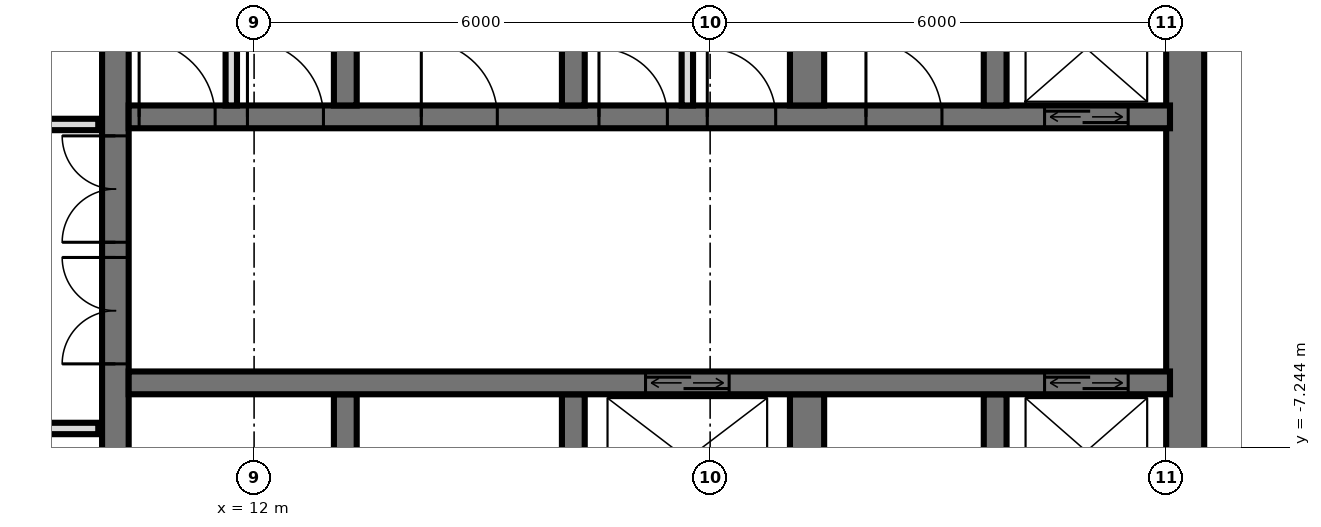
"""IFC4 building model, lengths in metres.
Left out: names, types, materials, properties, quantities, classifications, styles, units other than length and angle.
Written with IfcOpenShell. Run it as: python <this file> out.ifc"""

import sys

from ifc_helpers import new_model, si_unit, direction, frame, frame_2d, origin, place, context, subcontext, project, spatial, rectangle, extrude, element, fill, save


model = new_model("IFC4")
c1 = context("Model", 3, precision=1e-05, world=origin(), true_north=direction((0.0, 1.0)))
c2 = subcontext(c1, "Body", "Model", "MODEL_VIEW")
j1 = project(units=[si_unit("LENGTHUNIT", "METRE"), si_unit("PLANEANGLEUNIT", "RADIAN")], contexts=[c1])
p1 = place(None, origin())
s1 = spatial("IfcSite", under=j1, at=p1, CompositionType="ELEMENT")
p2 = place(p1, origin())
s2 = spatial("IfcBuilding", under=s1, at=p2, CompositionType="ELEMENT")
p3 = place(p2, frame((0.0, 0.0, 239.6)))
s3 = spatial("IfcBuildingStorey", under=s2, at=p3, CompositionType="ELEMENT", Elevation=239.6)
p4 = place(p3, frame((10.175, -14.55, 0.0), z_axis=(0.0, 0.0, 1.0), x_axis=(0.0, 1.0, 0.0)))
e1 = element("IfcWall", 1, at=p4, inside=s3, PredefinedType="SHEAR", context=c2, shape_type="SweptSolid", body=[
    extrude(rectangle(XDim=14.1, YDim=0.35, at=frame_2d((7.05, 0.0))), origin(), (0.0, 0.0, 1.0), 3.5),
])
p5 = place(p4, frame((8.4, 0.0, 0.0)))
e2 = element("IfcOpeningElement", 2, at=p5, cuts=e1, PredefinedType="OPENING", context=c2, shape_type="SweptSolid", body=[
    extrude(rectangle(XDim=1.4, YDim=2.4, at=frame_2d((0.7, 1.2))), frame((0.0, 0.185, 0.0), z_axis=(0.0, -1.0, 0.0), x_axis=(1.0, 0.0, 0.0)), (0.0, 0.0, 1.0), 0.37),
])
p6 = place(p4, frame((10.0, 0.0, 0.0)))
e3 = element("IfcOpeningElement", 3, at=p6, cuts=e1, PredefinedType="OPENING", context=c2, shape_type="SweptSolid", body=[
    extrude(rectangle(XDim=1.4, YDim=2.4, at=frame_2d((0.7, 1.2))), frame((0.0, 0.185, 0.0), z_axis=(0.0, -1.0, 0.0), x_axis=(1.0, 0.0, 0.0)), (0.0, 0.0, 1.0), 0.37),
])
p7 = place(p4, frame((4.0, 0.0, 0.0)))
e4 = element("IfcOpeningElement", 4, at=p7, cuts=e1, PredefinedType="OPENING", context=c2, shape_type="SweptSolid", body=[
    extrude(rectangle(XDim=1.2, YDim=2.1, at=frame_2d((0.6, 1.05))), frame((0.0, 0.185, 0.0), z_axis=(0.0, -1.0, 0.0), x_axis=(1.0, 0.0, 0.0)), (0.0, 0.0, 1.0), 0.37),
])
p8 = place(p3, frame((24.25, -14.55, 0.0), z_axis=(0.0, 0.0, 1.0), x_axis=(0.0, 1.0, 0.0)))
e5 = element("IfcWall", 5, at=p8, inside=s3, PredefinedType="SHEAR", context=c2, shape_type="SweptSolid", body=[
    extrude(rectangle(XDim=14.1, YDim=0.5, at=frame_2d((7.05, 0.0))), origin(), (0.0, 0.0, 1.0), 3.5),
])
p9 = place(p3, frame((10.35, -2.9, 0.0), z_axis=(0.0, 0.0, 1.0), x_axis=(1.0, 0.0, 0.0)))
e6 = element("IfcWall", 6, at=p9, inside=s3, PredefinedType="SHEAR", context=c2, shape_type="SweptSolid", body=[
    extrude(rectangle(XDim=13.7, YDim=0.3, at=frame_2d((6.85, 0.0))), origin(), (0.0, 0.0, 1.0), 3.5),
])
p10 = place(p9, frame((12.05, 0.0, 0.0)))
e7 = element("IfcOpeningElement", 7, at=p10, cuts=e6, PredefinedType="OPENING", context=c2, shape_type="SweptSolid", body=[
    extrude(rectangle(XDim=1.1, YDim=2.1, at=frame_2d((0.55, 1.05))), frame((0.0, 0.16, 0.0), z_axis=(0.0, -1.0, 0.0), x_axis=(1.0, 0.0, 0.0)), (0.0, 0.0, 1.0), 0.32),
])
p11 = place(p9, frame((6.188, 0.0, 0.0)))
e8 = element("IfcOpeningElement", 8, at=p11, cuts=e6, PredefinedType="OPENING", context=c2, shape_type="SweptSolid", body=[
    extrude(rectangle(XDim=0.9, YDim=2.1, at=frame_2d((0.45, 1.05))), frame((0.0, 0.16, 0.0), z_axis=(0.0, -1.0, 0.0), x_axis=(1.0, 0.0, 0.0)), (0.0, 0.0, 1.0), 0.32),
])
p12 = place(p9, frame((7.613, 0.0, 0.0)))
e9 = element("IfcOpeningElement", 9, at=p12, cuts=e6, PredefinedType="OPENING", context=c2, shape_type="SweptSolid", body=[
    extrude(rectangle(XDim=0.9, YDim=2.1, at=frame_2d((0.45, 1.05))), frame((0.0, 0.16, 0.0), z_axis=(0.0, -1.0, 0.0), x_axis=(1.0, 0.0, 0.0)), (0.0, 0.0, 1.0), 0.32),
])
p13 = place(p9, frame((0.137, 0.0, 0.0)))
e10 = element("IfcOpeningElement", 10, at=p13, cuts=e6, PredefinedType="OPENING", context=c2, shape_type="SweptSolid", body=[
    extrude(rectangle(XDim=1.0, YDim=2.1, at=frame_2d((0.5, 1.05))), frame((0.0, 0.16, 0.0), z_axis=(0.0, -1.0, 0.0), x_axis=(1.0, 0.0, 0.0)), (0.0, 0.0, 1.0), 0.32),
])
p14 = place(p9, frame((1.562, 0.0, 0.0)))
e11 = element("IfcOpeningElement", 11, at=p14, cuts=e6, PredefinedType="OPENING", context=c2, shape_type="SweptSolid", body=[
    extrude(rectangle(XDim=1.0, YDim=2.1, at=frame_2d((0.5, 1.05))), frame((0.0, 0.16, 0.0), z_axis=(0.0, -1.0, 0.0), x_axis=(1.0, 0.0, 0.0)), (0.0, 0.0, 1.0), 0.32),
])
p15 = place(p9, frame((3.85, 0.0, 0.0)))
e12 = element("IfcOpeningElement", 12, at=p15, cuts=e6, PredefinedType="OPENING", context=c2, shape_type="SweptSolid", body=[
    extrude(rectangle(XDim=1.0, YDim=2.1, at=frame_2d((0.5, 1.05))), frame((0.0, 0.16, 0.0), z_axis=(0.0, -1.0, 0.0), x_axis=(1.0, 0.0, 0.0)), (0.0, 0.0, 1.0), 0.32),
])
p16 = place(p9, frame((9.7, 0.0, 0.0)))
e13 = element("IfcOpeningElement", 13, at=p16, cuts=e6, PredefinedType="OPENING", context=c2, shape_type="SweptSolid", body=[
    extrude(rectangle(XDim=1.0, YDim=2.1, at=frame_2d((0.5, 1.05))), frame((0.0, 0.16, 0.0), z_axis=(0.0, -1.0, 0.0), x_axis=(1.0, 0.0, 0.0)), (0.0, 0.0, 1.0), 0.32),
])
p17 = place(p3, frame((10.35, -6.4, 0.0), z_axis=(0.0, 0.0, 1.0), x_axis=(1.0, 0.0, 0.0)))
e14 = element("IfcWall", 14, at=p17, inside=s3, PredefinedType="SHEAR", context=c2, shape_type="SweptSolid", body=[
    extrude(rectangle(XDim=13.7, YDim=0.3, at=frame_2d((6.85, 0.0))), origin(), (0.0, 0.0, 1.0), 3.5),
])
p18 = place(p17, frame((12.05, 0.0, 0.0)))
e15 = element("IfcOpeningElement", 15, at=p18, cuts=e14, PredefinedType="OPENING", context=c2, shape_type="SweptSolid", body=[
    extrude(rectangle(XDim=1.1, YDim=2.1, at=frame_2d((0.55, 1.05))), frame((0.0, 0.16, 0.0), z_axis=(0.0, -1.0, 0.0), x_axis=(1.0, 0.0, 0.0)), (0.0, 0.0, 1.0), 0.32),
])
p19 = place(p17, frame((6.8, 0.0, 0.0)))
e16 = element("IfcOpeningElement", 16, at=p19, cuts=e14, PredefinedType="OPENING", context=c2, shape_type="SweptSolid", body=[
    extrude(rectangle(XDim=1.1, YDim=2.1, at=frame_2d((0.55, 1.05))), frame((0.0, 0.16, 0.0), z_axis=(0.0, -1.0, 0.0), x_axis=(1.0, 0.0, 0.0)), (0.0, 0.0, 1.0), 0.32),
])
for number, where, z_axis, x_axis in (
    (17, (13.2, -2.75, 0.0), (0.0, 0.0, 1.0), (0.0, 1.0, 0.0)),
    (18, (13.2, -8.85, 0.0), (0.0, 0.0, 1.0), (0.0, 1.0, 0.0)),
    (19, (16.2, -2.75, 0.0), (0.0, 0.0, 1.0), (0.0, 1.0, 0.0)),
    (20, (16.2, -8.85, 0.0), (0.0, 0.0, 1.0), (0.0, 1.0, 0.0)),
):
    element("IfcWall", number, at=place(p3, frame(where, z_axis=z_axis, x_axis=x_axis)), inside=s3, PredefinedType="SHEAR", context=c2, shape_type="SweptSolid", body=[
        extrude(rectangle(XDim=2.3, YDim=0.3, at=frame_2d((1.15, 0.0))), origin(), (0.0, 0.0, 1.0), 3.5),
    ])
for number, where, z_axis, x_axis in (
    (21, (19.275, -2.75, 0.0), (0.0, 0.0, 1.0), (0.0, 1.0, 0.0)),
    (22, (19.275, -8.85, 0.0), (0.0, 0.0, 1.0), (0.0, 1.0, 0.0)),
):
    element("IfcWall", number, at=place(p3, frame(where, z_axis=z_axis, x_axis=x_axis)), inside=s3, PredefinedType="SHEAR", context=c2, shape_type="SweptSolid", body=[
        extrude(rectangle(XDim=2.3, YDim=0.45, at=frame_2d((1.15, 0.0))), origin(), (0.0, 0.0, 1.0), 3.5),
    ])
for number, where, z_axis, x_axis in (
    (23, (21.75, -2.75, 0.0), (0.0, 0.0, 1.0), (0.0, 1.0, 0.0)),
    (24, (21.75, -8.85, 0.0), (0.0, 0.0, 1.0), (0.0, 1.0, 0.0)),
):
    element("IfcWall", number, at=place(p3, frame(where, z_axis=z_axis, x_axis=x_axis)), inside=s3, PredefinedType="SHEAR", context=c2, shape_type="SweptSolid", body=[
        extrude(rectangle(XDim=2.3, YDim=0.3, at=frame_2d((1.15, 0.0))), origin(), (0.0, 0.0, 1.0), 3.5),
    ])
for number, where, z_axis, x_axis in (
    (25, (17.7, -2.75, 0.0), (0.0, 0.0, 1.0), (0.0, 1.0, 0.0)),
    (26, (11.7, -2.75, 0.0), (0.0, 0.0, 1.0), (0.0, 1.0, 0.0)),
):
    element("IfcWall", number, at=place(p3, frame(where, z_axis=z_axis, x_axis=x_axis)), inside=s3, PredefinedType="PARTITIONING", context=c2, shape_type="SweptSolid", body=[
        extrude(rectangle(XDim=2.3, YDim=0.15, at=frame_2d((1.15, 0.0))), origin(), (0.0, 0.0, 1.0), 3.2),
    ])
p20 = place(p3, frame((-9.95, -7.0, 0.0), z_axis=(0.0, 0.0, 1.0), x_axis=(1.0, 0.0, 0.0)))
e27 = element("IfcWall", 27, at=p20, inside=s3, PredefinedType="PARTITIONING", context=c2, shape_type="SweptSolid", body=[
    extrude(rectangle(XDim=19.9, YDim=0.15, at=frame_2d((9.95, 0.0))), origin(), (0.0, 0.0, 1.0), 3.22),
])
p21 = place(p20, frame((9.45, 0.0, 0.0)))
e28 = element("IfcOpeningElement", 28, at=p21, cuts=e27, PredefinedType="OPENING", context=c2, shape_type="SweptSolid", body=[
    extrude(rectangle(XDim=1.0, YDim=2.1, at=frame_2d((0.5, 1.05))), frame((0.0, 0.085, 0.0), z_axis=(0.0, -1.0, 0.0), x_axis=(1.0, 0.0, 0.0)), (0.0, 0.0, 1.0), 0.17),
])
p22 = place(p20, frame((15.45, 0.0, 0.0)))
e29 = element("IfcOpeningElement", 29, at=p22, cuts=e27, PredefinedType="OPENING", context=c2, shape_type="SweptSolid", body=[
    extrude(rectangle(XDim=1.0, YDim=2.1, at=frame_2d((0.5, 1.05))), frame((0.0, 0.085, 0.0), z_axis=(0.0, -1.0, 0.0), x_axis=(1.0, 0.0, 0.0)), (0.0, 0.0, 1.0), 0.17),
])
p23 = place(p3, frame((-9.95, -3.0, 0.0), z_axis=(0.0, 0.0, 1.0), x_axis=(1.0, 0.0, 0.0)))
e30 = element("IfcWall", 30, at=p23, inside=s3, PredefinedType="PARTITIONING", context=c2, shape_type="SweptSolid", body=[
    extrude(rectangle(XDim=19.9, YDim=0.15, at=frame_2d((9.95, 0.0))), origin(), (0.0, 0.0, 1.0), 3.22),
])
p24 = place(p23, frame((2.2, 0.0, 0.0)))
e31 = element("IfcOpeningElement", 31, at=p24, cuts=e30, PredefinedType="OPENING", context=c2, shape_type="SweptSolid", body=[
    extrude(rectangle(XDim=1.0, YDim=2.1, at=frame_2d((0.5, 1.05))), frame((0.0, 0.085, 0.0), z_axis=(0.0, -1.0, 0.0), x_axis=(1.0, 0.0, 0.0)), (0.0, 0.0, 1.0), 0.17),
])
p25 = place(p23, frame((7.2, 0.0, 0.0)))
e32 = element("IfcOpeningElement", 32, at=p25, cuts=e30, PredefinedType="OPENING", context=c2, shape_type="SweptSolid", body=[
    extrude(rectangle(XDim=1.0, YDim=2.1, at=frame_2d((0.5, 1.05))), frame((0.0, 0.085, 0.0), z_axis=(0.0, -1.0, 0.0), x_axis=(1.0, 0.0, 0.0)), (0.0, 0.0, 1.0), 0.17),
])
p26 = place(p23, frame((11.7, 0.0, 0.0)))
e33 = element("IfcOpeningElement", 33, at=p26, cuts=e30, PredefinedType="OPENING", context=c2, shape_type="SweptSolid", body=[
    extrude(rectangle(XDim=1.0, YDim=2.1, at=frame_2d((0.5, 1.05))), frame((0.0, 0.085, 0.0), z_axis=(0.0, -1.0, 0.0), x_axis=(1.0, 0.0, 0.0)), (0.0, 0.0, 1.0), 0.17),
])
p27 = place(p23, frame((15.45, 0.0, 0.0)))
e34 = element("IfcOpeningElement", 34, at=p27, cuts=e30, PredefinedType="OPENING", context=c2, shape_type="SweptSolid", body=[
    extrude(rectangle(XDim=1.0, YDim=2.1, at=frame_2d((0.5, 1.05))), frame((0.0, 0.085, 0.0), z_axis=(0.0, -1.0, 0.0), x_axis=(1.0, 0.0, 0.0)), (0.0, 0.0, 1.0), 0.17),
])
p28 = place(p23, frame((18.2, 0.0, 0.0)))
e35 = element("IfcOpeningElement", 35, at=p28, cuts=e30, PredefinedType="OPENING", context=c2, shape_type="SweptSolid", body=[
    extrude(rectangle(XDim=1.0, YDim=2.1, at=frame_2d((0.5, 1.05))), frame((0.0, 0.085, 0.0), z_axis=(0.0, -1.0, 0.0), x_axis=(1.0, 0.0, 0.0)), (0.0, 0.0, 1.0), 0.17),
])
p29 = place(p10, origin())
e36 = element("IfcDoor", 36, at=p29, inside=s3, OperationType="DOUBLE_DOOR_SLIDING", PredefinedType="USERDEFINED", context=c2, shape_type="SweptSolid", body=[
    extrude(rectangle(XDim=1.1, YDim=2.1, at=frame_2d((0.55, 1.05))), frame((0.0, 0.025, 0.0), z_axis=(0.0, -1.0, 0.0), x_axis=(1.0, 0.0, 0.0)), (0.0, 0.0, 1.0), 0.05),
])
fill(e7, e36)
p30 = place(p18, origin())
e37 = element("IfcDoor", 37, at=p30, inside=s3, OperationType="DOUBLE_DOOR_SLIDING", PredefinedType="USERDEFINED", context=c2, shape_type="SweptSolid", body=[
    extrude(rectangle(XDim=1.1, YDim=2.1, at=frame_2d((0.55, 1.05))), frame((0.0, 0.025, 0.0), z_axis=(0.0, -1.0, 0.0), x_axis=(1.0, 0.0, 0.0)), (0.0, 0.0, 1.0), 0.05),
])
fill(e15, e37)
p31 = place(p19, origin())
e38 = element("IfcDoor", 38, at=p31, inside=s3, OperationType="DOUBLE_DOOR_SLIDING", PredefinedType="USERDEFINED", context=c2, shape_type="SweptSolid", body=[
    extrude(rectangle(XDim=1.1, YDim=2.1, at=frame_2d((0.55, 1.05))), frame((0.0, 0.025, 0.0), z_axis=(0.0, -1.0, 0.0), x_axis=(1.0, 0.0, 0.0)), (0.0, 0.0, 1.0), 0.05),
])
fill(e16, e38)
p32 = place(p5, origin())
e39 = element("IfcDoor", 39, at=p32, inside=s3, OperationType="DOUBLE_DOOR_SINGLE_SWING", PredefinedType="DOOR", context=c2, shape_type="SweptSolid", body=[
    extrude(rectangle(XDim=1.4, YDim=2.4, at=frame_2d((0.7, 1.2))), frame((0.0, 0.025, 0.0), z_axis=(0.0, -1.0, 0.0), x_axis=(1.0, 0.0, 0.0)), (0.0, 0.0, 1.0), 0.05),
])
fill(e2, e39)
p33 = place(p6, origin())
e40 = element("IfcDoor", 40, at=p33, inside=s3, OperationType="DOUBLE_DOOR_SINGLE_SWING", PredefinedType="DOOR", context=c2, shape_type="SweptSolid", body=[
    extrude(rectangle(XDim=1.4, YDim=2.4, at=frame_2d((0.7, 1.2))), frame((0.0, 0.025, 0.0), z_axis=(0.0, -1.0, 0.0), x_axis=(1.0, 0.0, 0.0)), (0.0, 0.0, 1.0), 0.05),
])
fill(e3, e40)
p34 = place(p11, origin())
e41 = element("IfcDoor", 41, at=p34, inside=s3, OperationType="SINGLE_SWING_RIGHT", PredefinedType="DOOR", context=c2, shape_type="SweptSolid", body=[
    extrude(rectangle(XDim=0.9, YDim=2.1, at=frame_2d((0.45, 1.05))), frame((0.0, 0.025, 0.0), z_axis=(0.0, -1.0, 0.0), x_axis=(1.0, 0.0, 0.0)), (0.0, 0.0, 1.0), 0.05),
])
fill(e8, e41)
p35 = place(p12, origin())
e42 = element("IfcDoor", 42, at=p35, inside=s3, OperationType="SINGLE_SWING_RIGHT", PredefinedType="DOOR", context=c2, shape_type="SweptSolid", body=[
    extrude(rectangle(XDim=0.9, YDim=2.1, at=frame_2d((0.45, 1.05))), frame((0.0, 0.025, 0.0), z_axis=(0.0, -1.0, 0.0), x_axis=(1.0, 0.0, 0.0)), (0.0, 0.0, 1.0), 0.05),
])
fill(e9, e42)
p36 = place(p13, origin())
e43 = element("IfcDoor", 43, at=p36, inside=s3, OperationType="SINGLE_SWING_RIGHT", PredefinedType="DOOR", context=c2, shape_type="SweptSolid", body=[
    extrude(rectangle(XDim=1.0, YDim=2.1, at=frame_2d((0.5, 1.05))), frame((0.0, 0.025, 0.0), z_axis=(0.0, -1.0, 0.0), x_axis=(1.0, 0.0, 0.0)), (0.0, 0.0, 1.0), 0.05),
])
fill(e10, e43)
p37 = place(p14, origin())
e44 = element("IfcDoor", 44, at=p37, inside=s3, OperationType="SINGLE_SWING_RIGHT", PredefinedType="DOOR", context=c2, shape_type="SweptSolid", body=[
    extrude(rectangle(XDim=1.0, YDim=2.1, at=frame_2d((0.5, 1.05))), frame((0.0, 0.025, 0.0), z_axis=(0.0, -1.0, 0.0), x_axis=(1.0, 0.0, 0.0)), (0.0, 0.0, 1.0), 0.05),
])
fill(e11, e44)
p38 = place(p15, origin())
e45 = element("IfcDoor", 45, at=p38, inside=s3, OperationType="SINGLE_SWING_RIGHT", PredefinedType="DOOR", context=c2, shape_type="SweptSolid", body=[
    extrude(rectangle(XDim=1.0, YDim=2.1, at=frame_2d((0.5, 1.05))), frame((0.0, 0.025, 0.0), z_axis=(0.0, -1.0, 0.0), x_axis=(1.0, 0.0, 0.0)), (0.0, 0.0, 1.0), 0.05),
])
fill(e12, e45)
p39 = place(p16, origin())
e46 = element("IfcDoor", 46, at=p39, inside=s3, OperationType="SINGLE_SWING_RIGHT", PredefinedType="DOOR", context=c2, shape_type="SweptSolid", body=[
    extrude(rectangle(XDim=1.0, YDim=2.1, at=frame_2d((0.5, 1.05))), frame((0.0, 0.025, 0.0), z_axis=(0.0, -1.0, 0.0), x_axis=(1.0, 0.0, 0.0)), (0.0, 0.0, 1.0), 0.05),
])
fill(e13, e46)
save(model, sys.argv[1])
